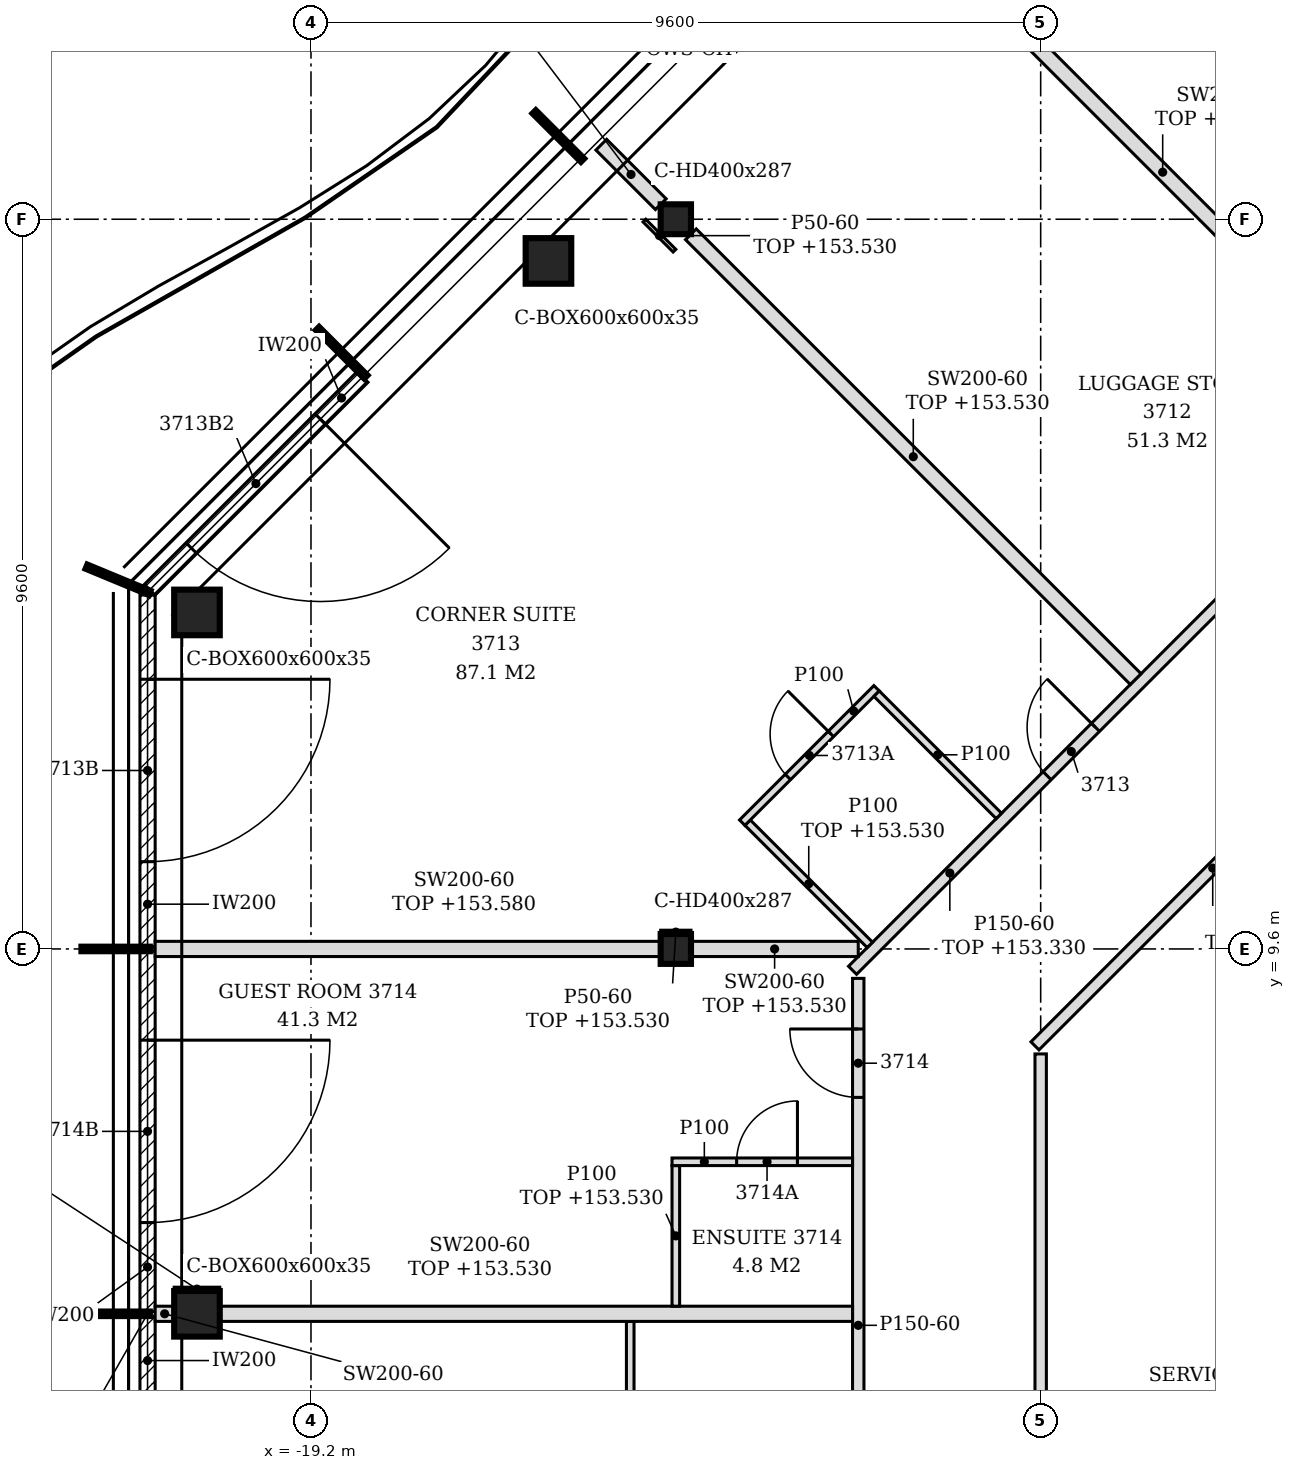
"""IFC4 building model, lengths in metres.
Left out: names, types, materials, properties, quantities, classifications, styles, units other than length and angle.
Written with IfcOpenShell. Run it as: python <this file> out.ifc"""

import sys

from ifc_helpers import new_model, si_unit, direction, frame, frame_2d, origin, origin_2d, place, context, subcontext, project, spatial, polyline, rectangle, hollow_rectangle, i_section, outline, extrude, element, fill, save


model = new_model("IFC4")
c1 = context("Model", 3, precision=1e-05, world=origin(), true_north=direction((0.0, 1.0)))
c2 = subcontext(c1, "Body", "Model", "MODEL_VIEW")
j1 = project(units=[si_unit("LENGTHUNIT", "METRE"), si_unit("PLANEANGLEUNIT", "RADIAN")], contexts=[c1])
p1 = place(None, origin())
s1 = spatial("IfcSite", under=j1, at=p1, CompositionType="ELEMENT")
p2 = place(p1, origin())
s2 = spatial("IfcBuilding", under=s1, at=p2, CompositionType="ELEMENT")
p3 = place(p2, frame((0.0, 0.0, 150.6)))
s3 = spatial("IfcBuildingStorey", under=s2, at=p3, CompositionType="ELEMENT", Elevation=150.6)
for number, where, z_axis, x_axis in (
    (1, (-16.076, 18.652, -0.15), (0.0, 0.0, 1.0), (1.0, 0.0, 0.0)),
    (2, (-20.7, 14.027, -0.15), (0.0, 0.0, 1.0), (1.0, 0.0, 0.0)),
    (3, (-20.7, 4.8, -0.15), (0.0, 0.0, 1.0), (1.0, 0.0, 0.0)),
):
    element("IfcColumn", number, at=place(p3, frame(where, z_axis=z_axis, x_axis=x_axis)), inside=s3, PredefinedType="COLUMN", context=c2, shape_type="SweptSolid", body=[
        extrude(hollow_rectangle(XDim=0.6, YDim=0.6, WallThickness=0.035, at=origin_2d()), origin(), (0.0, 0.0, 1.0), 3.6),
    ])
for number, where, z_axis, x_axis in (
    (4, (-14.4, 9.6, -0.15), (0.0, 0.0, 1.0), (1.0, 0.0, 0.0)),
    (5, (-14.4, 19.2, -0.15), (0.0, 0.0, 1.0), (1.0, 0.0, 0.0)),
):
    element("IfcColumn", number, at=place(p3, frame(where, z_axis=z_axis, x_axis=x_axis)), inside=s3, PredefinedType="COLUMN", context=c2, shape_type="SweptSolid", body=[
        extrude(i_section(OverallWidth=0.399, OverallDepth=0.393, WebThickness=0.023, FlangeThickness=0.037, FilletRadius=0.015, at=origin_2d()), origin(), (0.0, 0.0, 1.0), 3.6),
    ])
p4 = place(p3, frame((-18.521, 17.126, 0.0), z_axis=(0.0, 0.0, 1.0), x_axis=(-0.707106781187, -0.707106781187, 0.0)))
e6 = element("IfcWall", 6, at=p4, inside=s3, PredefinedType="NOTDEFINED", context=c2, shape_type="SweptSolid", body=[
    extrude(rectangle(XDim=3.962, YDim=0.2, at=frame_2d((1.981, 0.0))), origin(), (0.0, 0.0, 1.0), 3.45),
])
p5 = place(p4, frame((0.786, 0.0, 0.0)))
e7 = element("IfcOpeningElement", 7, at=p5, cuts=e6, PredefinedType="OPENING", context=c2, shape_type="SweptSolid", body=[
    extrude(rectangle(XDim=2.4, YDim=2.4, at=frame_2d((1.2, 1.2))), frame((0.0, 0.11, 0.0), z_axis=(0.0, -1.0, 0.0), x_axis=(1.0, 0.0, 0.0)), (0.0, 0.0, 1.0), 0.22),
])
p6 = place(p3, frame((-21.35, 14.256, 0.0), z_axis=(0.0, 0.0, 1.0), x_axis=(0.0, -1.0, 0.0)))
e8 = element("IfcWall", 8, at=p6, inside=s3, PredefinedType="NOTDEFINED", context=c2, shape_type="SweptSolid", body=[
    extrude(rectangle(XDim=4.626, YDim=0.2, at=frame_2d((2.313, 0.0))), origin(), (0.0, 0.0, 1.0), 3.45),
])
p7 = place(p6, frame((1.108, 0.0, 0.0)))
e9 = element("IfcOpeningElement", 9, at=p7, cuts=e8, PredefinedType="OPENING", context=c2, shape_type="SweptSolid", body=[
    extrude(rectangle(XDim=2.4, YDim=2.4, at=frame_2d((1.2, 1.2))), frame((0.0, 0.11, 0.0), z_axis=(0.0, -1.0, 0.0), x_axis=(1.0, 0.0, 0.0)), (0.0, 0.0, 1.0), 0.22),
])
p8 = place(p3, frame((-21.35, 9.57, 0.0), z_axis=(0.0, 0.0, 1.0), x_axis=(0.0, -1.0, 0.0)))
e10 = element("IfcWall", 10, at=p8, inside=s3, PredefinedType="NOTDEFINED", context=c2, shape_type="SweptSolid", body=[
    extrude(rectangle(XDim=4.74, YDim=0.2, at=frame_2d((2.37, 0.0))), origin(), (0.0, 0.0, 1.0), 3.45),
])
p9 = place(p8, frame((1.17, 0.0, 0.0)))
e11 = element("IfcOpeningElement", 11, at=p9, cuts=e10, PredefinedType="OPENING", context=c2, shape_type="SweptSolid", body=[
    extrude(rectangle(XDim=2.4, YDim=2.4, at=frame_2d((1.2, 1.2))), frame((0.0, 0.11, 0.0), z_axis=(0.0, -1.0, 0.0), x_axis=(1.0, 0.0, 0.0)), (0.0, 0.0, 1.0), 0.22),
])
p10 = place(p3, frame((-21.35, 4.77, 0.0), z_axis=(0.0, 0.0, 1.0), x_axis=(0.0, -1.0, 0.0)))
e12 = element("IfcWall", 12, at=p10, inside=s3, PredefinedType="NOTDEFINED", context=c2, shape_type="SweptSolid", body=[
    extrude(rectangle(XDim=4.74, YDim=0.2, at=frame_2d((2.37, 0.0))), origin(), (0.0, 0.0, 1.0), 3.45),
])
p11 = place(p10, frame((1.17, 0.0, 0.0)))
e13 = element("IfcOpeningElement", 13, at=p11, cuts=e12, PredefinedType="OPENING", context=c2, shape_type="SweptSolid", body=[
    extrude(rectangle(XDim=2.4, YDim=2.4, at=frame_2d((1.2, 1.2))), frame((0.0, 0.11, 0.0), z_axis=(0.0, -1.0, 0.0), x_axis=(1.0, 0.0, 0.0)), (0.0, 0.0, 1.0), 0.22),
])
p12 = place(p3, frame((-12.0, -4.7, 0.0), z_axis=(0.0, 0.0, 1.0), x_axis=(0.0, 1.0, 0.0)))
e14 = element("IfcWall", 14, at=p12, inside=s3, PredefinedType="PARTITIONING", context=c2, shape_type="SweptSolid", body=[
    extrude(outline(polyline([(0.0, 0.0), (13.913, 0.0), (13.913, 3.45), (9.6, 3.45), (9.598, 2.93), (9.4, 2.93), (9.398, 3.45), (4.8, 3.45), (4.798, 2.93), (4.6, 2.93), (4.598, 3.45), (0.0, 3.45), (0.0, 0.0)])), frame((0.0, 0.075, 0.0), z_axis=(0.0, -1.0, 0.0), x_axis=(1.0, 0.0, 0.0)), (0.0, 0.0, 1.0), 0.15),
])
p13 = place(p12, frame((12.347, 0.0, 0.0)))
e15 = element("IfcOpeningElement", 15, at=p13, cuts=e14, PredefinedType="OPENING", context=c2, shape_type="SweptSolid", body=[
    extrude(rectangle(XDim=0.9, YDim=2.1, at=frame_2d((0.45, 1.05))), frame((0.0, 0.085, 0.0), z_axis=(0.0, -1.0, 0.0), x_axis=(1.0, 0.0, 0.0)), (0.0, 0.0, 1.0), 0.17),
])
p14 = place(p12, frame((5.45, 0.0, 0.0)))
e16 = element("IfcOpeningElement", 16, at=p14, cuts=e14, PredefinedType="OPENING", context=c2, shape_type="SweptSolid", body=[
    extrude(rectangle(XDim=0.9, YDim=2.1, at=frame_2d((0.45, 1.05))), frame((0.0, 0.085, 0.0), z_axis=(0.0, -1.0, 0.0), x_axis=(1.0, 0.0, 0.0)), (0.0, 0.0, 1.0), 0.17),
])
p15 = place(p12, frame((1.777, 0.0, 0.0)))
e17 = element("IfcOpeningElement", 17, at=p15, cuts=e14, PredefinedType="OPENING", context=c2, shape_type="SweptSolid", body=[
    extrude(rectangle(XDim=0.9, YDim=2.1, at=frame_2d((0.45, 1.05))), frame((0.0, 0.085, 0.0), z_axis=(0.0, -1.0, 0.0), x_axis=(1.0, 0.0, 0.0)), (0.0, 0.0, 1.0), 0.17),
])
p16 = place(p3, frame((-9.6, -1.125, 0.0), z_axis=(0.0, 0.0, 1.0), x_axis=(0.0, 1.0, 0.0)))
e18 = element("IfcWall", 18, at=p16, inside=s3, PredefinedType="PARTITIONING", context=c2, shape_type="SweptSolid", body=[
    extrude(outline(polyline([(0.0, 0.0), (9.344, 0.0), (9.344, 3.45), (6.025, 3.45), (6.023, 2.93), (5.825, 2.93), (5.823, 3.45), (1.225, 3.45), (1.223, 2.93), (1.025, 2.93), (1.023, 3.45), (0.0, 3.45), (0.0, 0.0)])), frame((0.0, 0.075, 0.0), z_axis=(0.0, -1.0, 0.0), x_axis=(1.0, 0.0, 0.0)), (0.0, 0.0, 1.0), 0.15),
])
p17 = place(p3, frame((-15.0, 2.45, 0.0), z_axis=(0.0, 0.0, 1.0), x_axis=(0.0, 1.0, 0.0)))
e19 = element("IfcWall", 19, at=p17, inside=s3, PredefinedType="PARTITIONING", context=c2, shape_type="SweptSolid", body=[
    extrude(rectangle(XDim=2.25, YDim=0.1, at=frame_2d((1.125, 0.0))), origin(), (0.0, 0.0, 1.0), 3.45),
])
p18 = place(p3, frame((-21.25, 4.8, 0.0), z_axis=(0.0, 0.0, 1.0), x_axis=(1.0, 0.0, 0.0)))
e20 = element("IfcWall", 20, at=p18, inside=s3, PredefinedType="PARTITIONING", context=c2, shape_type="SweptSolid", body=[
    extrude(rectangle(XDim=0.25, YDim=0.2, at=frame_2d((0.125, 0.0))), origin(), (0.0, 0.0, 1.0), 3.45),
])
p19 = place(p3, frame((-20.4, 4.8, 0.0), z_axis=(0.0, 0.0, 1.0), x_axis=(1.0, 0.0, 0.0)))
e21 = element("IfcWall", 21, at=p19, inside=s3, PredefinedType="PARTITIONING", context=c2, shape_type="SweptSolid", body=[
    extrude(rectangle(XDim=8.325, YDim=0.2, at=frame_2d((4.163, 0.0))), origin(), (0.0, 0.0, 1.0), 2.93),
])
p20 = place(p3, frame((-14.4, 4.9, 0.0), z_axis=(0.0, 0.0, 1.0), x_axis=(0.0, 1.0, 0.0)))
e22 = element("IfcWall", 22, at=p20, inside=s3, PredefinedType="PARTITIONING", context=c2, shape_type="SweptSolid", body=[
    extrude(rectangle(XDim=1.85, YDim=0.1, at=frame_2d((0.925, 0.0))), origin(), (0.0, 0.0, 1.0), 2.93),
])
p21 = place(p3, frame((-14.45, 6.8, 0.0), z_axis=(0.0, 0.0, 1.0), x_axis=(1.0, 0.0, 0.0)))
e23 = element("IfcWall", 23, at=p21, inside=s3, PredefinedType="PARTITIONING", context=c2, shape_type="SweptSolid", body=[
    extrude(outline(polyline([(0.0, 0.0), (2.375, 0.0), (2.375, 3.45), (0.2, 3.45), (0.198, 2.93), (0.0, 2.93), (0.0, 0.0)])), frame((0.0, 0.05, 0.0), z_axis=(0.0, -1.0, 0.0), x_axis=(1.0, 0.0, 0.0)), (0.0, 0.0, 1.0), 0.1),
])
p22 = place(p21, frame((0.85, 0.0, 0.0)))
e24 = element("IfcOpeningElement", 24, at=p22, cuts=e23, PredefinedType="OPENING", context=c2, shape_type="SweptSolid", body=[
    extrude(rectangle(XDim=0.8, YDim=2.1, at=frame_2d((0.4, 1.05))), frame((0.0, 0.06, 0.0), z_axis=(0.0, -1.0, 0.0), x_axis=(1.0, 0.0, 0.0)), (0.0, 0.0, 1.0), 0.12),
])
p23 = place(p3, frame((-9.675, 8.325, 0.0), z_axis=(0.0, 0.0, 1.0), x_axis=(0.707106781187, 0.707106781187, 0.0)))
e25 = element("IfcWall", 25, at=p23, inside=s3, PredefinedType="PARTITIONING", context=c2, shape_type="SweptSolid", body=[
    extrude(rectangle(XDim=6.614, YDim=0.15, at=frame_2d((3.307, 0.0))), origin(), (0.0, 0.0, 1.0), 2.93),
])
p24 = place(p3, frame((-12.075, 9.319, 0.0), z_axis=(0.0, 0.0, 1.0), x_axis=(0.707106781187, 0.707106781187, 0.0)))
e26 = element("IfcWall", 26, at=p24, inside=s3, PredefinedType="PARTITIONING", context=c2, shape_type="SweptSolid", body=[
    extrude(rectangle(XDim=13.793, YDim=0.15, at=frame_2d((6.896, 0.0))), origin(), (0.0, 0.0, 1.0), 2.73),
])
p25 = place(p24, frame((11.692, 0.0, 0.0)))
e27 = element("IfcOpeningElement", 27, at=p25, cuts=e26, PredefinedType="OPENING", context=c2, shape_type="SweptSolid", body=[
    extrude(rectangle(XDim=0.9, YDim=2.1, at=frame_2d((0.45, 1.05))), frame((0.0, 0.085, 0.0), z_axis=(0.0, -1.0, 0.0), x_axis=(1.0, 0.0, 0.0)), (0.0, 0.0, 1.0), 0.17),
])
p26 = place(p24, frame((7.376, 0.0, 0.0)))
e28 = element("IfcOpeningElement", 28, at=p26, cuts=e26, PredefinedType="OPENING", context=c2, shape_type="SweptSolid", body=[
    extrude(rectangle(XDim=0.9, YDim=2.1, at=frame_2d((0.45, 1.05))), frame((0.0, 0.085, 0.0), z_axis=(0.0, -1.0, 0.0), x_axis=(1.0, 0.0, 0.0)), (0.0, 0.0, 1.0), 0.17),
])
p27 = place(p24, frame((3.62, 0.0, 0.0)))
e29 = element("IfcOpeningElement", 29, at=p27, cuts=e26, PredefinedType="OPENING", context=c2, shape_type="SweptSolid", body=[
    extrude(rectangle(XDim=0.9, YDim=2.1, at=frame_2d((0.45, 1.05))), frame((0.0, 0.085, 0.0), z_axis=(0.0, -1.0, 0.0), x_axis=(1.0, 0.0, 0.0)), (0.0, 0.0, 1.0), 0.17),
])
p28 = place(p3, frame((-21.25, 9.6, 0.0), z_axis=(0.0, 0.0, 1.0), x_axis=(1.0, 0.0, 0.0)))
e30 = element("IfcWall", 30, at=p28, inside=s3, PredefinedType="PARTITIONING", context=c2, shape_type="SweptSolid", body=[
    extrude(outline(polyline([(0.0, 0.0), (6.65, 0.0), (6.65, 2.98), (0.7, 2.98), (0.698, 2.93), (0.4, 2.93), (0.398, 2.98), (0.0, 2.98), (0.0, 0.0)])), frame((0.0, 0.1, 0.0), z_axis=(0.0, -1.0, 0.0), x_axis=(1.0, 0.0, 0.0)), (0.0, 0.0, 1.0), 0.2),
])
p29 = place(p3, frame((-14.2, 9.6, 0.0), z_axis=(0.0, 0.0, 1.0), x_axis=(1.0, 0.0, 0.0)))
e31 = element("IfcWall", 31, at=p29, inside=s3, PredefinedType="PARTITIONING", context=c2, shape_type="SweptSolid", body=[
    extrude(rectangle(XDim=2.2, YDim=0.2, at=frame_2d((1.1, 0.0))), origin(), (0.0, 0.0, 1.0), 2.93),
])
p30 = place(p3, frame((-11.847, 9.653, 0.0), z_axis=(0.0, 0.0, 1.0), x_axis=(-0.707106781187, 0.707106781187, 0.0)))
e32 = element("IfcWall", 32, at=p30, inside=s3, PredefinedType="PARTITIONING", context=c2, shape_type="SweptSolid", body=[
    extrude(rectangle(XDim=2.275, YDim=0.1, at=frame_2d((1.137, 0.0))), origin(), (0.0, 0.0, 1.0), 2.93),
])
p31 = place(p3, frame((-13.526, 11.262, 0.0), z_axis=(0.0, 0.0, 1.0), x_axis=(0.707106781187, 0.707106781187, 0.0)))
e33 = element("IfcWall", 33, at=p31, inside=s3, PredefinedType="PARTITIONING", context=c2, shape_type="SweptSolid", body=[
    extrude(rectangle(XDim=2.5, YDim=0.1, at=frame_2d((1.25, 0.0))), origin(), (0.0, 0.0, 1.0), 3.45),
])
p32 = place(p31, frame((0.85, 0.0, 0.0)))
e34 = element("IfcOpeningElement", 34, at=p32, cuts=e33, PredefinedType="OPENING", context=c2, shape_type="SweptSolid", body=[
    extrude(rectangle(XDim=0.8, YDim=2.1, at=frame_2d((0.4, 1.05))), frame((0.0, 0.06, 0.0), z_axis=(0.0, -1.0, 0.0), x_axis=(1.0, 0.0, 0.0)), (0.0, 0.0, 1.0), 0.12),
])
p33 = place(p3, frame((-10.15, 11.35, 0.0), z_axis=(0.0, 0.0, 1.0), x_axis=(-0.707160441348, 0.707053116953, 0.0)))
e35 = element("IfcWall", 35, at=p33, inside=s3, PredefinedType="PARTITIONING", context=c2, shape_type="SweptSolid", body=[
    extrude(rectangle(XDim=2.275, YDim=0.1, at=frame_2d((1.137, 0.0))), origin(), (0.0, 0.0, 1.0), 3.45),
])
p34 = place(p3, frame((-8.35, 13.15, 0.0), z_axis=(0.0, 0.0, 1.0), x_axis=(-0.707092030896, 0.707121531169, 0.0)))
e36 = element("IfcWall", 36, at=p34, inside=s3, PredefinedType="PARTITIONING", context=c2, shape_type="SweptSolid", body=[
    extrude(rectangle(XDim=8.276, YDim=0.2, at=frame_2d((4.138, 0.0))), origin(), (0.0, 0.0, 1.0), 2.93),
])
p35 = place(p3, frame((-4.838, 16.662, 0.0), z_axis=(0.0, 0.0, 1.0), x_axis=(-0.707120452615, 0.707093109494, 0.0)))
e37 = element("IfcWall", 37, at=p35, inside=s3, PredefinedType="PARTITIONING", context=c2, shape_type="SweptSolid", body=[
    extrude(rectangle(XDim=8.929, YDim=0.2, at=frame_2d((4.464, 0.0))), origin(), (0.0, 0.0, 1.0), 2.73),
])
p36 = place(p3, frame((-14.598, 19.398, 0.0), z_axis=(0.0, 0.0, 1.0), x_axis=(-0.707106781187, 0.707106781187, 0.0)))
e38 = element("IfcWall", 38, at=p36, inside=s3, PredefinedType="PARTITIONING", context=c2, shape_type="SweptSolid", body=[
    extrude(rectangle(XDim=1.107, YDim=0.2, at=frame_2d((0.554, 0.0))), origin(), (0.0, 0.0, 1.0), 2.63),
])
p37 = place(p3, frame((-21.0, 5.125, 0.0), z_axis=(0.0, 0.0, 1.0), x_axis=(1.0, 0.0, 0.0)))
e39 = element("IfcWall", 39, at=p37, inside=s3, PredefinedType="PARTITIONING", context=c2, shape_type="SweptSolid", body=[
    extrude(rectangle(XDim=0.6, YDim=0.05, at=frame_2d((0.3, 0.0))), origin(), (0.0, 0.0, 1.0), 2.93),
])
p38 = place(p3, frame((-14.6, 9.822, 0.0), z_axis=(0.0, 0.0, 1.0), x_axis=(1.0, 0.0, 0.0)))
e40 = element("IfcWall", 40, at=p38, inside=s3, PredefinedType="PARTITIONING", context=c2, shape_type="SweptSolid", body=[
    extrude(rectangle(XDim=0.399, YDim=0.05, at=frame_2d((0.2, 0.0))), origin(), (0.0, 0.0, 1.0), 2.93),
])
p39 = place(p3, frame((-14.418, 18.786, 0.0), z_axis=(0.0, 0.0, 1.0), x_axis=(-0.707106781187, 0.707106781187, 0.0)))
e41 = element("IfcWall", 41, at=p39, inside=s3, PredefinedType="PARTITIONING", context=c2, shape_type="SweptSolid", body=[
    extrude(rectangle(XDim=0.56, YDim=0.05, at=frame_2d((0.28, 0.0))), origin(), (0.0, 0.0, 1.0), 2.93),
])
p40 = place(p5, origin())
e42 = element("IfcDoor", 42, at=p40, inside=s3, OperationType="SINGLE_SWING_LEFT", PredefinedType="DOOR", context=c2, shape_type="SweptSolid", body=[
    extrude(rectangle(XDim=2.4, YDim=2.4, at=frame_2d((1.2, 1.2))), frame((0.0, 0.025, 0.0), z_axis=(0.0, -1.0, 0.0), x_axis=(1.0, 0.0, 0.0)), (0.0, 0.0, 1.0), 0.05),
])
fill(e7, e42)
p41 = place(p7, origin())
e43 = element("IfcDoor", 43, at=p41, inside=s3, OperationType="SINGLE_SWING_LEFT", PredefinedType="DOOR", context=c2, shape_type="SweptSolid", body=[
    extrude(rectangle(XDim=2.4, YDim=2.4, at=frame_2d((1.2, 1.2))), frame((0.0, 0.025, 0.0), z_axis=(0.0, -1.0, 0.0), x_axis=(1.0, 0.0, 0.0)), (0.0, 0.0, 1.0), 0.05),
])
fill(e9, e43)
p42 = place(p9, origin())
e44 = element("IfcDoor", 44, at=p42, inside=s3, OperationType="SINGLE_SWING_LEFT", PredefinedType="DOOR", context=c2, shape_type="SweptSolid", body=[
    extrude(rectangle(XDim=2.4, YDim=2.4, at=frame_2d((1.2, 1.2))), frame((0.0, 0.025, 0.0), z_axis=(0.0, -1.0, 0.0), x_axis=(1.0, 0.0, 0.0)), (0.0, 0.0, 1.0), 0.05),
])
fill(e11, e44)
p43 = place(p27, origin())
e45 = element("IfcDoor", 45, at=p43, inside=s3, OperationType="SINGLE_SWING_RIGHT", PredefinedType="DOOR", context=c2, shape_type="SweptSolid", body=[
    extrude(rectangle(XDim=0.9, YDim=2.1, at=frame_2d((0.45, 1.05))), frame((0.0, 0.025, 0.0), z_axis=(0.0, -1.0, 0.0), x_axis=(1.0, 0.0, 0.0)), (0.0, 0.0, 1.0), 0.05),
])
fill(e29, e45)
p44 = place(p32, origin())
e46 = element("IfcDoor", 46, at=p44, inside=s3, OperationType="SINGLE_SWING_RIGHT", PredefinedType="DOOR", context=c2, shape_type="SweptSolid", body=[
    extrude(rectangle(XDim=0.8, YDim=2.1, at=frame_2d((0.4, 1.05))), frame((0.0, 0.025, 0.0), z_axis=(0.0, -1.0, 0.0), x_axis=(1.0, 0.0, 0.0)), (0.0, 0.0, 1.0), 0.05),
])
fill(e34, e46)
p45 = place(p13, origin())
e47 = element("IfcDoor", 47, at=p45, inside=s3, OperationType="SINGLE_SWING_RIGHT", PredefinedType="DOOR", context=c2, shape_type="SweptSolid", body=[
    extrude(rectangle(XDim=0.9, YDim=2.1, at=frame_2d((0.45, 1.05))), frame((0.0, 0.025, 0.0), z_axis=(0.0, -1.0, 0.0), x_axis=(1.0, 0.0, 0.0)), (0.0, 0.0, 1.0), 0.05),
])
fill(e15, e47)
p46 = place(p22, origin())
e48 = element("IfcDoor", 48, at=p46, inside=s3, OperationType="SINGLE_SWING_RIGHT", PredefinedType="DOOR", context=c2, shape_type="SweptSolid", body=[
    extrude(rectangle(XDim=0.8, YDim=2.1, at=frame_2d((0.4, 1.05))), frame((0.0, 0.025, 0.0), z_axis=(0.0, -1.0, 0.0), x_axis=(1.0, 0.0, 0.0)), (0.0, 0.0, 1.0), 0.05),
])
fill(e24, e48)
save(model, sys.argv[1])
